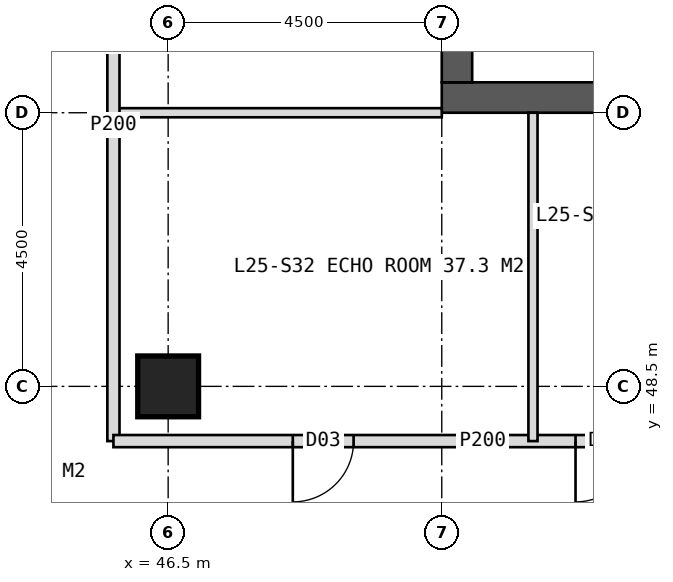
"""IFC4 building model, lengths in metres.
Left out: names, types, materials, properties, quantities, classifications, styles, units other than length and angle.
Written with IfcOpenShell. Run it as: python <this file> out.ifc"""

import sys

from ifc_helpers import new_model, si_unit, direction, frame, frame_2d, origin, origin_2d, place, context, subcontext, project, spatial, rectangle, hollow_rectangle, extrude, element, fill, save


model = new_model("IFC4")
c1 = context("Model", 3, precision=1e-05, world=origin(), true_north=direction((0.0, 1.0)))
c2 = subcontext(c1, "Body", "Model", "MODEL_VIEW")
j1 = project(units=[si_unit("LENGTHUNIT", "METRE"), si_unit("PLANEANGLEUNIT", "RADIAN")], contexts=[c1])
p1 = place(None, origin())
s1 = spatial("IfcSite", under=j1, at=p1, CompositionType="ELEMENT")
p2 = place(p1, origin())
s2 = spatial("IfcBuilding", under=s1, at=p2, CompositionType="ELEMENT")
p3 = place(p2, frame((0.0, 0.0, 108.0)))
s3 = spatial("IfcBuildingStorey", under=s2, at=p3, CompositionType="ELEMENT", Elevation=108.0)
p4 = place(p3, frame((51.0, 53.25, 0.0), z_axis=(0.0, 0.0, 1.0), x_axis=(1.0, 0.0, 0.0)))
e1 = element("IfcWall", 1, at=p4, inside=s3, PredefinedType="SHEAR", context=c2, shape_type="SweptSolid", body=[
    extrude(rectangle(XDim=18.0, YDim=0.5, at=frame_2d((9.0, 0.0))), origin(), (0.0, 0.0, 1.0), 4.0),
])
p5 = place(p4, frame((8.1, 0.0, 0.0)))
e2 = element("IfcOpeningElement", 2, at=p5, cuts=e1, PredefinedType="OPENING", context=c2, shape_type="SweptSolid", body=[
    extrude(rectangle(XDim=1.8, YDim=2.2, at=frame_2d((0.9, 1.1))), frame((0.0, 0.26, 0.0), z_axis=(0.0, -1.0, 0.0), x_axis=(1.0, 0.0, 0.0)), (0.0, 0.0, 1.0), 0.52),
])
p6 = place(p3, frame((51.25, 53.5, 0.0), z_axis=(0.0, 0.0, 1.0), x_axis=(0.0, 1.0, 0.0)))
e3 = element("IfcWall", 3, at=p6, inside=s3, PredefinedType="SHEAR", context=c2, shape_type="SweptSolid", body=[
    extrude(rectangle(XDim=17.0, YDim=0.5, at=frame_2d((8.5, 0.0))), origin(), (0.0, 0.0, 1.0), 4.0),
])
p7 = place(p6, frame((6.0, 0.0, 0.0)))
e4 = element("IfcOpeningElement", 4, at=p7, cuts=e3, PredefinedType="OPENING", context=c2, shape_type="SweptSolid", body=[
    extrude(rectangle(XDim=1.5, YDim=2.2, at=frame_2d((0.75, 1.1))), frame((0.0, 0.26, 0.0), z_axis=(0.0, -1.0, 0.0), x_axis=(1.0, 0.0, 0.0)), (0.0, 0.0, 1.0), 0.52),
])
p8 = place(p3, frame((46.5, 48.5, 0.0), z_axis=(0.0, 0.0, 1.0), x_axis=(1.0, 0.0, 0.0)))
e5 = element("IfcColumn", 5, at=p8, inside=s3, PredefinedType="COLUMN", context=c2, shape_type="SweptSolid", body=[
    extrude(hollow_rectangle(XDim=1.0, YDim=1.0, WallThickness=0.1, at=origin_2d()), origin(), (0.0, 0.0, 1.0), 4.0),
])
p9 = place(p3, frame((51.0, 53.0, 0.0), z_axis=(0.0, 0.0, 1.0), x_axis=(-1.0, 0.0, 0.0)))
e6 = element("IfcWall", 6, at=p9, inside=s3, PredefinedType="PARTITIONING", context=c2, shape_type="SweptSolid", body=[
    extrude(rectangle(XDim=5.4, YDim=0.15, at=frame_2d((2.7, 0.0))), origin(), (0.0, 0.0, 1.0), 3.75),
])
p10 = place(p3, frame((45.6, 47.6, 0.0), z_axis=(0.0, 0.0, 1.0), x_axis=(0.0, 1.0, 0.0)))
e7 = element("IfcWall", 7, at=p10, inside=s3, PredefinedType="PARTITIONING", context=c2, shape_type="SweptSolid", body=[
    extrude(rectangle(XDim=10.4, YDim=0.2, at=frame_2d((5.2, 0.0))), origin(), (0.0, 0.0, 1.0), 3.75),
])
p11 = place(p10, frame((7.4, 0.0, 0.0)))
e8 = element("IfcOpeningElement", 8, at=p11, cuts=e7, PredefinedType="OPENING", context=c2, shape_type="SweptSolid", body=[
    extrude(rectangle(XDim=1.0, YDim=2.1, at=frame_2d((0.5, 1.05))), frame((0.0, 0.11, 0.0), z_axis=(0.0, -1.0, 0.0), x_axis=(1.0, 0.0, 0.0)), (0.0, 0.0, 1.0), 0.22),
])
p12 = place(p3, frame((57.75, 47.6, 0.0), z_axis=(0.0, 0.0, 1.0), x_axis=(-1.0, 0.0, 0.0)))
e9 = element("IfcWall", 9, at=p12, inside=s3, PredefinedType="PARTITIONING", context=c2, shape_type="SweptSolid", body=[
    extrude(rectangle(XDim=12.15, YDim=0.2, at=frame_2d((6.075, 0.0))), origin(), (0.0, 0.0, 1.0), 3.75),
])
p13 = place(p12, frame((3.55, 0.0, 0.0)))
e10 = element("IfcOpeningElement", 10, at=p13, cuts=e9, PredefinedType="OPENING", context=c2, shape_type="SweptSolid", body=[
    extrude(rectangle(XDim=1.0, YDim=2.1, at=frame_2d((0.5, 1.05))), frame((0.0, 0.11, 0.0), z_axis=(0.0, -1.0, 0.0), x_axis=(1.0, 0.0, 0.0)), (0.0, 0.0, 1.0), 0.22),
])
p14 = place(p12, frame((8.2, 0.0, 0.0)))
e11 = element("IfcOpeningElement", 11, at=p14, cuts=e9, PredefinedType="OPENING", context=c2, shape_type="SweptSolid", body=[
    extrude(rectangle(XDim=1.0, YDim=2.1, at=frame_2d((0.5, 1.05))), frame((0.0, 0.11, 0.0), z_axis=(0.0, -1.0, 0.0), x_axis=(1.0, 0.0, 0.0)), (0.0, 0.0, 1.0), 0.22),
])
p15 = place(p3, frame((52.5, 53.0, 0.0), z_axis=(0.0, 0.0, 1.0), x_axis=(0.0, -1.0, 0.0)))
e12 = element("IfcWall", 12, at=p15, inside=s3, PredefinedType="PARTITIONING", context=c2, shape_type="SweptSolid", body=[
    extrude(rectangle(XDim=5.4, YDim=0.15, at=frame_2d((2.7, 0.0))), origin(), (0.0, 0.0, 1.0), 3.75),
])
p16 = place(p13, origin())
e13 = element("IfcDoor", 13, at=p16, inside=s3, OperationType="SINGLE_SWING_RIGHT", PredefinedType="DOOR", context=c2, shape_type="SweptSolid", body=[
    extrude(rectangle(XDim=1.0, YDim=2.1, at=frame_2d((0.5, 1.05))), frame((0.0, 0.025, 0.0), z_axis=(0.0, -1.0, 0.0), x_axis=(1.0, 0.0, 0.0)), (0.0, 0.0, 1.0), 0.05),
])
fill(e10, e13)
p17 = place(p14, origin())
e14 = element("IfcDoor", 14, at=p17, inside=s3, OperationType="SINGLE_SWING_RIGHT", PredefinedType="DOOR", context=c2, shape_type="SweptSolid", body=[
    extrude(rectangle(XDim=1.0, YDim=2.1, at=frame_2d((0.5, 1.05))), frame((0.0, 0.025, 0.0), z_axis=(0.0, -1.0, 0.0), x_axis=(1.0, 0.0, 0.0)), (0.0, 0.0, 1.0), 0.05),
])
fill(e11, e14)
save(model, sys.argv[1])
